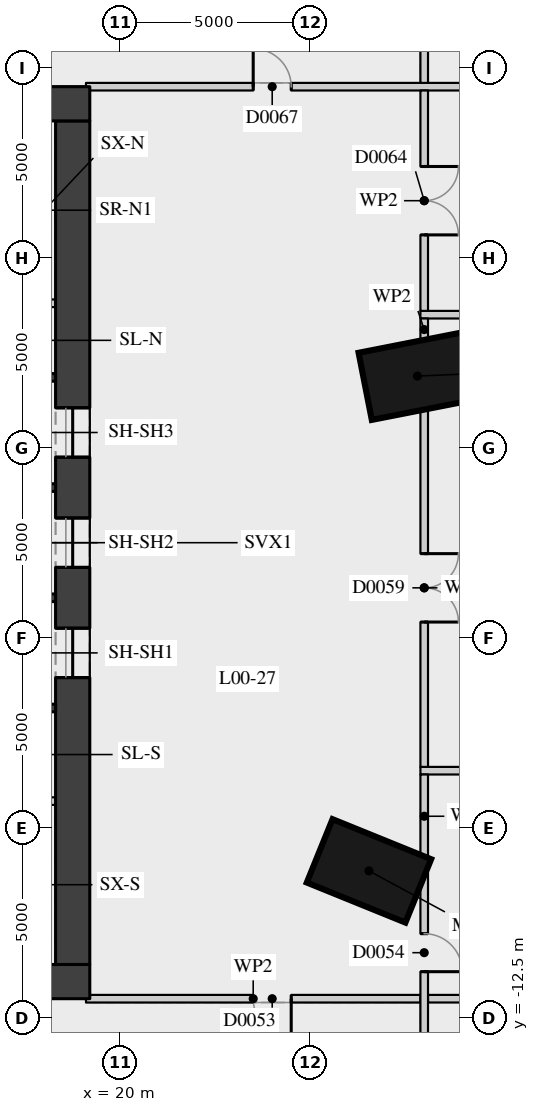
"""IFC4 building model, lengths in metres.
Left out: names, types, materials, properties, quantities, classifications, styles, units other than length and angle.
Written with IfcOpenShell. Run it as: python <this file> out.ifc"""

import sys

from ifc_helpers import new_model, si_unit, direction, frame, frame_2d, origin, origin_2d, place, context, subcontext, project, spatial, rectangle, extrude, element, fill, save


model = new_model("IFC4")
c1 = context("Model", 3, precision=1e-05, world=origin(), true_north=direction((0.0, 1.0)))
c2 = subcontext(c1, "Body", "Model", "MODEL_VIEW")
j1 = project(units=[si_unit("LENGTHUNIT", "METRE"), si_unit("PLANEANGLEUNIT", "RADIAN")], contexts=[c1])
p1 = place(None, origin())
s1 = spatial("IfcSite", under=j1, at=p1, CompositionType="ELEMENT")
p2 = place(p1, origin())
s2 = spatial("IfcBuilding", under=s1, at=p2, CompositionType="ELEMENT")
p3 = place(p2, origin())
s3 = spatial("IfcBuildingStorey", under=s2, at=p3, CompositionType="ELEMENT", Elevation=0.0)
for number, where, z_axis, x_axis in (
    (1, (27.821, 4.385, 0.0), (0.0, 0.0, 1.0), (0.981, 0.193, 0.0)),
    (2, (26.546, -8.636, 0.0), (0.0, 0.0, 1.0), (0.927, -0.376, 0.0)),
):
    element("IfcColumn", number, at=place(p3, frame(where, z_axis=z_axis, x_axis=x_axis)), inside=s3, PredefinedType="COLUMN", context=c2, shape_type="SweptSolid", body=[
        extrude(rectangle(XDim=2.8, YDim=1.8, at=origin_2d()), origin(), (0.0, 0.0, 1.0), 7.5),
    ])
p4 = place(p3, frame((18.75, -11.1, 0.0), z_axis=(0.0, 0.0, 1.0), x_axis=(0.0, 1.0, 0.0)))
e3 = element("IfcWall", 3, at=p4, inside=s3, PredefinedType="SHEAR", context=c2, shape_type="SweptSolid", body=[
    extrude(rectangle(XDim=22.2, YDim=0.9, at=frame_2d((11.1, 0.0))), origin(), (0.0, 0.0, 1.0), 7.09),
])
p5 = place(p4, frame((7.55, 0.0, 0.0)))
e4 = element("IfcOpeningElement", 4, at=p5, cuts=e3, PredefinedType="OPENING", context=c2, shape_type="SweptSolid", body=[
    extrude(rectangle(XDim=1.3, YDim=2.1, at=frame_2d((0.65, 1.05))), frame((0.0, 0.46, 0.0), z_axis=(0.0, -1.0, 0.0), x_axis=(1.0, 0.0, 0.0)), (0.0, 0.0, 1.0), 0.92),
])
p6 = place(p4, frame((10.45, 0.0, 0.0)))
e5 = element("IfcOpeningElement", 5, at=p6, cuts=e3, PredefinedType="OPENING", context=c2, shape_type="SweptSolid", body=[
    extrude(rectangle(XDim=1.3, YDim=2.1, at=frame_2d((0.65, 1.05))), frame((0.0, 0.46, 0.0), z_axis=(0.0, -1.0, 0.0), x_axis=(1.0, 0.0, 0.0)), (0.0, 0.0, 1.0), 0.92),
])
p7 = place(p4, frame((13.35, 0.0, 0.0)))
e6 = element("IfcOpeningElement", 6, at=p7, cuts=e3, PredefinedType="OPENING", context=c2, shape_type="SweptSolid", body=[
    extrude(rectangle(XDim=1.3, YDim=2.1, at=frame_2d((0.65, 1.05))), frame((0.0, 0.46, 0.0), z_axis=(0.0, -1.0, 0.0), x_axis=(1.0, 0.0, 0.0)), (0.0, 0.0, 1.0), 0.92),
])
for number, where, z_axis, x_axis in (
    (7, (4.0, 11.55, 0.0), (0.0, 0.0, 1.0), (1.0, 0.0, 0.0)),
    (8, (4.0, -11.55, 0.0), (0.0, 0.0, 1.0), (1.0, 0.0, 0.0)),
):
    element("IfcWall", number, at=place(p3, frame(where, z_axis=z_axis, x_axis=x_axis)), inside=s3, PredefinedType="SHEAR", context=c2, shape_type="SweptSolid", body=[
        extrude(rectangle(XDim=15.2, YDim=0.9, at=frame_2d((7.6, 0.0))), origin(), (0.0, 0.0, 1.0), 7.09),
    ])
for number, where, z_axis, x_axis in (
    (9, (16.0, -4.35, 0.0), (0.0, 0.0, 1.0), (1.0, 0.0, 0.0)),
    (10, (16.0, -1.45, 0.0), (0.0, 0.0, 1.0), (1.0, 0.0, 0.0)),
    (11, (16.0, 1.45, 0.0), (0.0, 0.0, 1.0), (1.0, 0.0, 0.0)),
    (12, (16.0, 4.35, 0.0), (0.0, 0.0, 1.0), (1.0, 0.0, 0.0)),
):
    element("IfcWall", number, at=place(p3, frame(where, z_axis=z_axis, x_axis=x_axis)), inside=s3, PredefinedType="SHEAR", context=c2, shape_type="SweptSolid", body=[
        extrude(rectangle(XDim=2.3, YDim=0.2, at=frame_2d((1.15, 0.0))), origin(), (0.0, 0.0, 1.0), 7.09),
    ])
p8 = place(p3, frame((16.0, 6.3, 0.0), z_axis=(0.0, 0.0, 1.0), x_axis=(1.0, 0.0, 0.0)))
e13 = element("IfcWall", 13, at=p8, inside=s3, PredefinedType="PARTITIONING", context=c2, shape_type="SweptSolid", body=[
    extrude(rectangle(XDim=2.3, YDim=0.2, at=frame_2d((1.15, 0.0))), origin(), (0.0, 0.0, 1.0), 7.09),
])
p9 = place(p8, frame((0.3, 0.0, 0.0)))
e14 = element("IfcOpeningElement", 14, at=p9, cuts=e13, PredefinedType="OPENING", context=c2, shape_type="SweptSolid", body=[
    extrude(rectangle(XDim=0.9, YDim=2.1, at=frame_2d((0.45, 1.05))), frame((0.0, 0.11, 0.0), z_axis=(0.0, -1.0, 0.0), x_axis=(1.0, 0.0, 0.0)), (0.0, 0.0, 1.0), 0.22),
])
p10 = place(p3, frame((16.0, -6.8, 0.0), z_axis=(0.0, 0.0, 1.0), x_axis=(1.0, 0.0, 0.0)))
e15 = element("IfcWall", 15, at=p10, inside=s3, PredefinedType="PARTITIONING", context=c2, shape_type="SweptSolid", body=[
    extrude(rectangle(XDim=2.3, YDim=0.2, at=frame_2d((1.15, 0.0))), origin(), (0.0, 0.0, 1.0), 7.09),
])
p11 = place(p10, frame((0.2, 0.0, 0.0)))
e16 = element("IfcOpeningElement", 16, at=p11, cuts=e15, PredefinedType="OPENING", context=c2, shape_type="SweptSolid", body=[
    extrude(rectangle(XDim=0.9, YDim=2.1, at=frame_2d((0.45, 1.05))), frame((0.0, 0.11, 0.0), z_axis=(0.0, -1.0, 0.0), x_axis=(1.0, 0.0, 0.0)), (0.0, 0.0, 1.0), 0.22),
])
p12 = place(p3, frame((19.1, -12.0, 0.0), z_axis=(0.0, 0.0, 1.0), x_axis=(1.0, 0.0, 0.0)))
e17 = element("IfcWall", 17, at=p12, inside=s3, PredefinedType="PARTITIONING", context=c2, shape_type="SweptSolid", body=[
    extrude(rectangle(XDim=8.8, YDim=0.2, at=frame_2d((4.4, 0.0))), origin(), (0.0, 0.0, 1.0), 7.09),
])
p13 = place(p12, frame((4.4, 0.0, 0.0)))
e18 = element("IfcOpeningElement", 18, at=p13, cuts=e17, PredefinedType="OPENING", context=c2, shape_type="SweptSolid", body=[
    extrude(rectangle(XDim=1.0, YDim=2.1, at=frame_2d((0.5, 1.05))), frame((0.0, 0.11, 0.0), z_axis=(0.0, -1.0, 0.0), x_axis=(1.0, 0.0, 0.0)), (0.0, 0.0, 1.0), 0.22),
])
p14 = place(p3, frame((28.1, -12.0, 0.0), z_axis=(0.0, 0.0, 1.0), x_axis=(1.0, 0.0, 0.0)))
e19 = element("IfcWall", 19, at=p14, inside=s3, PredefinedType="PARTITIONING", context=c2, shape_type="SweptSolid", body=[
    extrude(rectangle(XDim=12.767, YDim=0.2, at=frame_2d((6.383, 0.0))), origin(), (0.0, 0.0, 1.0), 6.19),
])
for number, where, z_axis, x_axis in (
    (20, (27.9, -6.0, 0.0), (0.0, 0.0, 1.0), (1.0, 0.0, 0.0)),
    (21, (27.9, 6.0, 0.0), (0.0, 0.0, 1.0), (1.0, 0.0, 0.0)),
):
    element("IfcWall", number, at=place(p3, frame(where, z_axis=z_axis, x_axis=x_axis)), inside=s3, PredefinedType="PARTITIONING", context=c2, shape_type="SweptSolid", body=[
        extrude(rectangle(XDim=15.125, YDim=0.2, at=frame_2d((7.562, 0.0))), origin(), (0.0, 0.0, 1.0), 6.09),
    ])
p15 = place(p3, frame((19.1, 12.0, 0.0), z_axis=(0.0, 0.0, 1.0), x_axis=(1.0, 0.0, 0.0)))
e22 = element("IfcWall", 22, at=p15, inside=s3, PredefinedType="PARTITIONING", context=c2, shape_type="SweptSolid", body=[
    extrude(rectangle(XDim=21.767, YDim=0.2, at=frame_2d((10.883, 0.0))), origin(), (0.0, 0.0, 1.0), 6.09),
])
p16 = place(p15, frame((4.4, 0.0, 0.0)))
e23 = element("IfcOpeningElement", 23, at=p16, cuts=e22, PredefinedType="OPENING", context=c2, shape_type="SweptSolid", body=[
    extrude(rectangle(XDim=1.0, YDim=2.1, at=frame_2d((0.5, 1.05))), frame((0.0, 0.11, 0.0), z_axis=(0.0, -1.0, 0.0), x_axis=(1.0, 0.0, 0.0)), (0.0, 0.0, 1.0), 0.22),
])
p17 = place(p3, frame((28.0, -25.932, 0.0), z_axis=(0.0, 0.0, 1.0), x_axis=(0.0, 1.0, 0.0)))
e24 = element("IfcWall", 24, at=p17, inside=s3, PredefinedType="PARTITIONING", context=c2, shape_type="SweptSolid", body=[
    extrude(rectangle(XDim=17.255, YDim=0.2, at=frame_2d((8.627, 0.0))), origin(), (0.0, 0.0, 1.0), 7.09),
])
p18 = place(p17, frame((14.643, 0.0, 0.0)))
e25 = element("IfcOpeningElement", 25, at=p18, cuts=e24, PredefinedType="OPENING", context=c2, shape_type="SweptSolid", body=[
    extrude(rectangle(XDim=1.0, YDim=2.1, at=frame_2d((0.5, 1.05))), frame((0.0, 0.11, 0.0), z_axis=(0.0, -1.0, 0.0), x_axis=(1.0, 0.0, 0.0)), (0.0, 0.0, 1.0), 0.22),
])
p19 = place(p17, frame((6.516, 0.0, 0.0)))
e26 = element("IfcOpeningElement", 26, at=p19, cuts=e24, PredefinedType="OPENING", context=c2, shape_type="SweptSolid", body=[
    extrude(rectangle(XDim=1.0, YDim=2.1, at=frame_2d((0.5, 1.05))), frame((0.0, 0.11, 0.0), z_axis=(0.0, -1.0, 0.0), x_axis=(1.0, 0.0, 0.0)), (0.0, 0.0, 1.0), 0.22),
])
p20 = place(p3, frame((28.0, -8.298, 0.0), z_axis=(0.0, 0.0, 1.0), x_axis=(0.0, 1.0, 0.0)))
e27 = element("IfcWall", 27, at=p20, inside=s3, PredefinedType="PARTITIONING", context=c2, shape_type="SweptSolid", body=[
    extrude(rectangle(XDim=2.198, YDim=0.2, at=frame_2d((1.099, 0.0))), origin(), (0.0, 0.0, 1.0), 7.09),
])
p21 = place(p3, frame((28.0, -5.9, 0.0), z_axis=(0.0, 0.0, 1.0), x_axis=(0.0, 1.0, 0.0)))
e28 = element("IfcWall", 28, at=p21, inside=s3, PredefinedType="PARTITIONING", context=c2, shape_type="SweptSolid", body=[
    extrude(rectangle(XDim=9.424, YDim=0.2, at=frame_2d((4.712, 0.0))), origin(), (0.0, 0.0, 1.0), 5.94),
])
p22 = place(p21, frame((3.812, 0.0, 0.0)))
e29 = element("IfcOpeningElement", 29, at=p22, cuts=e28, PredefinedType="OPENING", context=c2, shape_type="SweptSolid", body=[
    extrude(rectangle(XDim=1.8, YDim=2.1, at=frame_2d((0.9, 1.05))), frame((0.0, 0.11, 0.0), z_axis=(0.0, -1.0, 0.0), x_axis=(1.0, 0.0, 0.0)), (0.0, 0.0, 1.0), 0.22),
])
p23 = place(p3, frame((28.0, 5.315, 0.0), z_axis=(0.0, 0.0, 1.0), x_axis=(0.0, 1.0, 0.0)))
e30 = element("IfcWall", 30, at=p23, inside=s3, PredefinedType="PARTITIONING", context=c2, shape_type="SweptSolid", body=[
    extrude(rectangle(XDim=0.584, YDim=0.2, at=frame_2d((0.292, 0.0))), origin(), (0.0, 0.0, 1.0), 7.09),
])
p24 = place(p3, frame((28.0, 6.1, 0.0), z_axis=(0.0, 0.0, 1.0), x_axis=(0.0, 1.0, 0.0)))
e31 = element("IfcWall", 31, at=p24, inside=s3, PredefinedType="PARTITIONING", context=c2, shape_type="SweptSolid", body=[
    extrude(rectangle(XDim=5.8, YDim=0.2, at=frame_2d((2.9, 0.0))), origin(), (0.0, 0.0, 1.0), 7.09),
])
p25 = place(p24, frame((2.0, 0.0, 0.0)))
e32 = element("IfcOpeningElement", 32, at=p25, cuts=e31, PredefinedType="OPENING", context=c2, shape_type="SweptSolid", body=[
    extrude(rectangle(XDim=1.8, YDim=2.1, at=frame_2d((0.9, 1.05))), frame((0.0, 0.11, 0.0), z_axis=(0.0, -1.0, 0.0), x_axis=(1.0, 0.0, 0.0)), (0.0, 0.0, 1.0), 0.22),
])
p26 = place(p3, frame((28.0, 12.1, 0.0), z_axis=(0.0, 0.0, 1.0), x_axis=(0.0, 1.0, 0.0)))
e33 = element("IfcWall", 33, at=p26, inside=s3, PredefinedType="PARTITIONING", context=c2, shape_type="SweptSolid", body=[
    extrude(rectangle(XDim=13.832, YDim=0.2, at=frame_2d((6.916, 0.0))), origin(), (0.0, 0.0, 1.0), 7.09),
])
p27 = place(p26, frame((6.416, 0.0, 0.0)))
e34 = element("IfcOpeningElement", 34, at=p27, cuts=e33, PredefinedType="OPENING", context=c2, shape_type="SweptSolid", body=[
    extrude(rectangle(XDim=1.0, YDim=2.1, at=frame_2d((0.5, 1.05))), frame((0.0, 0.11, 0.0), z_axis=(0.0, -1.0, 0.0), x_axis=(1.0, 0.0, 0.0)), (0.0, 0.0, 1.0), 0.22),
])
p28 = place(p5, origin())
e35 = element("IfcDoor", 35, at=p28, inside=s3, OperationType="DOUBLE_DOOR_SLIDING", PredefinedType="DOOR", context=c2, shape_type="SweptSolid", body=[
    extrude(rectangle(XDim=1.3, YDim=2.1, at=frame_2d((0.65, 1.05))), frame((0.0, 0.025, 0.0), z_axis=(0.0, -1.0, 0.0), x_axis=(1.0, 0.0, 0.0)), (0.0, 0.0, 1.0), 0.05),
])
fill(e4, e35)
p29 = place(p6, origin())
e36 = element("IfcDoor", 36, at=p29, inside=s3, OperationType="DOUBLE_DOOR_SLIDING", PredefinedType="DOOR", context=c2, shape_type="SweptSolid", body=[
    extrude(rectangle(XDim=1.3, YDim=2.1, at=frame_2d((0.65, 1.05))), frame((0.0, 0.025, 0.0), z_axis=(0.0, -1.0, 0.0), x_axis=(1.0, 0.0, 0.0)), (0.0, 0.0, 1.0), 0.05),
])
fill(e5, e36)
p30 = place(p7, origin())
e37 = element("IfcDoor", 37, at=p30, inside=s3, OperationType="DOUBLE_DOOR_SLIDING", PredefinedType="DOOR", context=c2, shape_type="SweptSolid", body=[
    extrude(rectangle(XDim=1.3, YDim=2.1, at=frame_2d((0.65, 1.05))), frame((0.0, 0.025, 0.0), z_axis=(0.0, -1.0, 0.0), x_axis=(1.0, 0.0, 0.0)), (0.0, 0.0, 1.0), 0.05),
])
fill(e6, e37)
p31 = place(p13, origin())
e38 = element("IfcDoor", 38, at=p31, inside=s3, OperationType="SINGLE_SWING_LEFT", PredefinedType="DOOR", context=c2, shape_type="SweptSolid", body=[
    extrude(rectangle(XDim=1.0, YDim=2.1, at=frame_2d((0.5, 1.05))), frame((0.0, 0.025, 0.0), z_axis=(0.0, -1.0, 0.0), x_axis=(1.0, 0.0, 0.0)), (0.0, 0.0, 1.0), 0.05),
])
fill(e18, e38)
p32 = place(p16, origin())
e39 = element("IfcDoor", 39, at=p32, inside=s3, OperationType="SINGLE_SWING_LEFT", PredefinedType="DOOR", context=c2, shape_type="SweptSolid", body=[
    extrude(rectangle(XDim=1.0, YDim=2.1, at=frame_2d((0.5, 1.05))), frame((0.0, 0.025, 0.0), z_axis=(0.0, -1.0, 0.0), x_axis=(1.0, 0.0, 0.0)), (0.0, 0.0, 1.0), 0.05),
])
fill(e23, e39)
p33 = place(p22, origin())
e40 = element("IfcDoor", 40, at=p33, inside=s3, OperationType="DOUBLE_DOOR_SINGLE_SWING", PredefinedType="DOOR", context=c2, shape_type="SweptSolid", body=[
    extrude(rectangle(XDim=1.8, YDim=2.1, at=frame_2d((0.9, 1.05))), frame((0.0, 0.025, 0.0), z_axis=(0.0, -1.0, 0.0), x_axis=(1.0, 0.0, 0.0)), (0.0, 0.0, 1.0), 0.05),
])
fill(e29, e40)
p34 = place(p18, origin())
e41 = element("IfcDoor", 41, at=p34, inside=s3, OperationType="SINGLE_SWING_RIGHT", PredefinedType="DOOR", context=c2, shape_type="SweptSolid", body=[
    extrude(rectangle(XDim=1.0, YDim=2.1, at=frame_2d((0.5, 1.05))), frame((0.0, 0.025, 0.0), z_axis=(0.0, -1.0, 0.0), x_axis=(1.0, 0.0, 0.0)), (0.0, 0.0, 1.0), 0.05),
])
fill(e25, e41)
p35 = place(p25, origin())
e42 = element("IfcDoor", 42, at=p35, inside=s3, OperationType="DOUBLE_DOOR_SINGLE_SWING", PredefinedType="DOOR", context=c2, shape_type="SweptSolid", body=[
    extrude(rectangle(XDim=1.8, YDim=2.1, at=frame_2d((0.9, 1.05))), frame((0.0, 0.025, 0.0), z_axis=(0.0, -1.0, 0.0), x_axis=(1.0, 0.0, 0.0)), (0.0, 0.0, 1.0), 0.05),
])
fill(e32, e42)
save(model, sys.argv[1])
